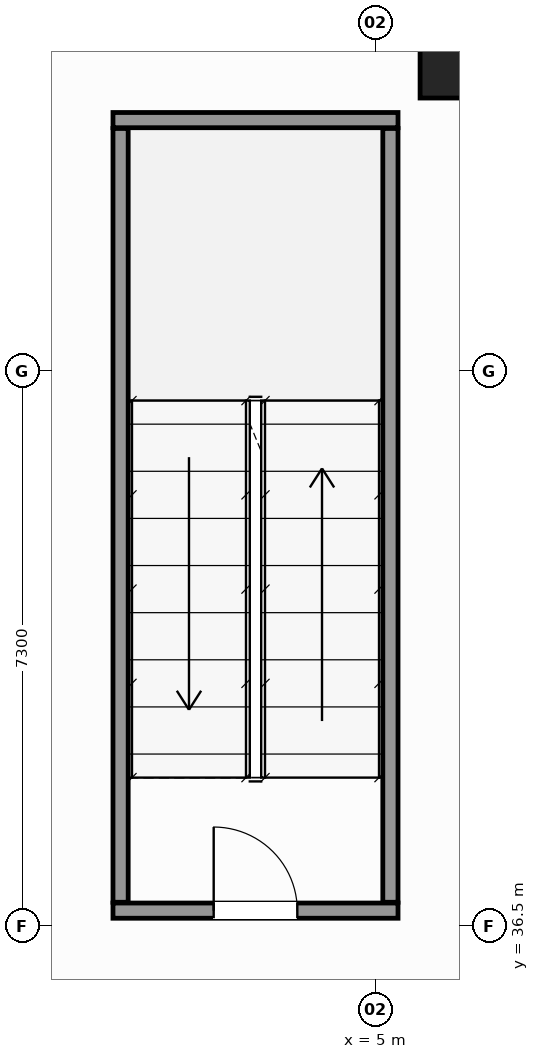
"""IFC4 building model, lengths in metres.
Left out: names, types, materials, properties, quantities, classifications, styles, units other than length and angle.
Written with IfcOpenShell. Run it as: python <this file> out.ifc"""

import sys

from ifc_helpers import new_model, si_unit, direction, frame, frame_2d, origin, origin_2d, place, context, subcontext, project, spatial, rectangle, hollow_circle, extrude, source, transform, mapped, element, fill, save


model = new_model("IFC4")
c1 = context("Model", 3, precision=1e-05, world=origin(), true_north=direction((0.0, 1.0)))
c2 = subcontext(c1, "Body", "Model", "MODEL_VIEW")
j1 = project(units=[si_unit("LENGTHUNIT", "METRE"), si_unit("PLANEANGLEUNIT", "RADIAN")], contexts=[c1])
p1 = place(None, origin())
s1 = spatial("IfcSite", under=j1, at=p1, CompositionType="ELEMENT")
p2 = place(p1, origin())
s2 = spatial("IfcBuilding", under=s1, at=p2, CompositionType="ELEMENT")
p3 = place(p2, frame((0.0, 0.0, -10.4)))
s3 = spatial("IfcBuildingStorey", under=s2, at=p3, CompositionType="ELEMENT", Elevation=-10.4)
m1 = source(origin(), c2, "Body", "SweptSolid", [
    extrude(hollow_circle(Radius=0.61, WallThickness=0.05, at=origin_2d()), origin(), (0.0, 0.0, 1.0), 5.2),
])
p4 = place(p3, frame((6.2, 48.0, 0.0), z_axis=(0.0, 0.0, 1.0), x_axis=(1.0, 0.0, 0.0)))
e1 = element("IfcColumn", 1, at=p4, inside=s3, PredefinedType="COLUMN", context=c2, shape_type="MappedRepresentation", body=[
    mapped(m1, transform((0.0, 0.0, 0.0), scale=1.0)),
])
p5 = place(p3, frame((1.55, 36.7, 0.0), z_axis=(0.0, 0.0, 1.0), x_axis=(1.0, 0.0, 0.0)))
e2 = element("IfcWall", 2, at=p5, inside=s3, PredefinedType="SOLIDWALL", context=c2, shape_type="SweptSolid", body=[
    extrude(rectangle(XDim=3.75, YDim=0.2, at=frame_2d((1.875, 0.0))), origin(), (0.0, 0.0, 1.0), 5.2),
])
p6 = place(p5, frame((1.325, 0.0, 0.0)))
e3 = element("IfcOpeningElement", 3, at=p6, cuts=e2, PredefinedType="OPENING", context=c2, shape_type="SweptSolid", body=[
    extrude(rectangle(XDim=1.1, YDim=2.15, at=frame_2d((0.55, 1.075))), frame((0.0, 0.11, 0.0), z_axis=(0.0, -1.0, 0.0), x_axis=(1.0, 0.0, 0.0)), (0.0, 0.0, 1.0), 0.22),
])
p7 = place(p3, frame((1.55, 47.1, 0.0), z_axis=(0.0, 0.0, 1.0), x_axis=(1.0, 0.0, 0.0)))
e4 = element("IfcWall", 4, at=p7, inside=s3, PredefinedType="SOLIDWALL", context=c2, shape_type="SweptSolid", body=[
    extrude(rectangle(XDim=3.75, YDim=0.2, at=frame_2d((1.875, 0.0))), origin(), (0.0, 0.0, 1.0), 5.2),
])
for number, where, z_axis, x_axis in (
    (5, (1.65, 36.81, 0.0), (0.0, 0.0, 1.0), (0.0, 1.0, 0.0)),
    (6, (5.2, 36.81, 0.0), (0.0, 0.0, 1.0), (0.0, 1.0, 0.0)),
):
    element("IfcWall", number, at=place(p3, frame(where, z_axis=z_axis, x_axis=x_axis)), inside=s3, PredefinedType="SOLIDWALL", context=c2, shape_type="SweptSolid", body=[
        extrude(rectangle(XDim=10.18, YDim=0.2, at=frame_2d((5.09, 0.0))), origin(), (0.0, 0.0, 1.0), 5.2),
    ])
m2 = source(origin(), c2, "Body", "SweptSolid", [
    extrude(rectangle(XDim=1.1, YDim=2.15, at=frame_2d((0.55, 1.075))), frame((0.0, 0.025, 0.0), z_axis=(0.0, -1.0, 0.0), x_axis=(1.0, 0.0, 0.0)), (0.0, 0.0, 1.0), 0.05),
])
p8 = place(p6, origin())
e7 = element("IfcDoor", 7, at=p8, inside=s3, OperationType="SINGLE_SWING_LEFT", PredefinedType="DOOR", context=c2, shape_type="MappedRepresentation", body=[
    mapped(m2, transform((0.0, 0.0, 0.0), scale=1.0)),
])
fill(e3, e7)
save(model, sys.argv[1])
